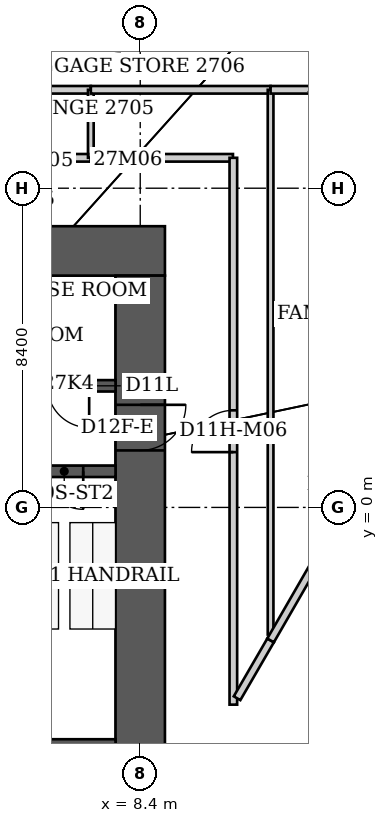
"""IFC4 building model, lengths in metres.
Left out: names, types, materials, properties, quantities, classifications, styles, units other than length and angle.
Written with IfcOpenShell. Run it as: python <this file> out.ifc"""

import sys

from ifc_helpers import new_model, si_unit, direction, frame, frame_2d, origin, place, context, subcontext, project, spatial, rectangle, extrude, element, fill, save


model = new_model("IFC4")
c1 = context("Model", 3, precision=1e-05, world=origin(), true_north=direction((0.0, 1.0)))
c2 = subcontext(c1, "Body", "Model", "MODEL_VIEW")
j1 = project(units=[si_unit("LENGTHUNIT", "METRE"), si_unit("PLANEANGLEUNIT", "RADIAN")], contexts=[c1])
p1 = place(None, origin())
s1 = spatial("IfcSite", under=j1, at=p1, CompositionType="ELEMENT")
p2 = place(p1, origin())
s2 = spatial("IfcBuilding", under=s1, at=p2, CompositionType="ELEMENT")
p3 = place(p2, frame((0.0, 0.0, 112.0)))
s3 = spatial("IfcBuildingStorey", under=s2, at=p3, CompositionType="ELEMENT", Elevation=112.0)
p4 = place(p3, frame((-9.05, 6.75, 0.0), z_axis=(0.0, 0.0, 1.0), x_axis=(1.0, 0.0, 0.0)))
e1 = element("IfcWall", 1, at=p4, inside=s3, PredefinedType="SHEAR", context=c2, shape_type="SweptSolid", body=[
    extrude(rectangle(XDim=18.1, YDim=1.3, at=frame_2d((9.05, 0.0))), origin(), (0.0, 0.0, 1.0), 3.8),
])
p5 = place(p3, frame((8.4, -9.2, 0.0), z_axis=(0.0, 0.0, 1.0), x_axis=(0.0, 1.0, 0.0)))
e2 = element("IfcWall", 2, at=p5, inside=s3, PredefinedType="SHEAR", context=c2, shape_type="SweptSolid", body=[
    extrude(rectangle(XDim=15.3, YDim=1.3, at=frame_2d((7.65, 0.0))), origin(), (0.0, 0.0, 1.0), 3.8),
])
p6 = place(p5, frame((10.7, 0.0, 0.0)))
e3 = element("IfcOpeningElement", 3, at=p6, cuts=e2, PredefinedType="OPENING", context=c2, shape_type="SweptSolid", body=[
    extrude(rectangle(XDim=1.2, YDim=2.2, at=frame_2d((0.6, 1.1))), frame((0.0, 0.65, 0.0), z_axis=(0.0, -1.0, 0.0), x_axis=(1.0, 0.0, 0.0)), (0.0, 0.0, 1.0), 1.3),
])
p7 = place(p3, frame((-7.75, -6.5, 0.0), z_axis=(0.0, 0.0, 1.0), x_axis=(1.0, 0.0, 0.0)))
e4 = element("IfcWall", 4, at=p7, inside=s3, PredefinedType="SHEAR", context=c2, shape_type="SweptSolid", body=[
    extrude(rectangle(XDim=15.5, YDim=0.8, at=frame_2d((7.75, 0.0))), origin(), (0.0, 0.0, 1.0), 3.8),
])
p8 = place(p3, frame((4.75, 0.95, 0.0), z_axis=(0.0, 0.0, 1.0), x_axis=(1.0, 0.0, 0.0)))
e5 = element("IfcWall", 5, at=p8, inside=s3, PredefinedType="SHEAR", context=c2, shape_type="SweptSolid", body=[
    extrude(rectangle(XDim=3.0, YDim=0.3, at=frame_2d((1.5, 0.0))), origin(), (0.0, 0.0, 1.0), 3.8),
])
p9 = place(p8, frame((1.15, 0.0, 0.0)))
e6 = element("IfcOpeningElement", 6, at=p9, cuts=e5, PredefinedType="OPENING", context=c2, shape_type="SweptSolid", body=[
    extrude(rectangle(XDim=1.0, YDim=2.2, at=frame_2d((0.5, 1.1))), frame((0.0, 0.15, 0.0), z_axis=(0.0, -1.0, 0.0), x_axis=(1.0, 0.0, 0.0)), (0.0, 0.0, 1.0), 0.3),
])
p10 = place(p3, frame((-7.75, 3.2, 0.0), z_axis=(0.0, 0.0, 1.0), x_axis=(1.0, 0.0, 0.0)))
e7 = element("IfcWall", 7, at=p10, inside=s3, PredefinedType="SHEAR", context=c2, shape_type="SweptSolid", body=[
    extrude(rectangle(XDim=15.5, YDim=0.3, at=frame_2d((7.75, 0.0))), origin(), (0.0, 0.0, 1.0), 3.8),
])
p11 = place(p10, frame((5.688, 0.0, 0.0)))
e8 = element("IfcOpeningElement", 8, at=p11, cuts=e7, PredefinedType="OPENING", context=c2, shape_type="SweptSolid", body=[
    extrude(rectangle(XDim=1.1, YDim=2.2, at=frame_2d((0.55, 1.1))), frame((0.0, 0.15, 0.0), z_axis=(0.0, -1.0, 0.0), x_axis=(1.0, 0.0, 0.0)), (0.0, 0.0, 1.0), 0.3),
])
p12 = place(p10, frame((8.031, 0.0, 0.0)))
e9 = element("IfcOpeningElement", 9, at=p12, cuts=e7, PredefinedType="OPENING", context=c2, shape_type="SweptSolid", body=[
    extrude(rectangle(XDim=1.1, YDim=2.2, at=frame_2d((0.55, 1.1))), frame((0.0, 0.15, 0.0), z_axis=(0.0, -1.0, 0.0), x_axis=(1.0, 0.0, 0.0)), (0.0, 0.0, 1.0), 0.3),
])
p13 = place(p10, frame((10.85, 0.0, 0.0)))
e10 = element("IfcOpeningElement", 10, at=p13, cuts=e7, PredefinedType="OPENING", context=c2, shape_type="SweptSolid", body=[
    extrude(rectangle(XDim=1.1, YDim=2.2, at=frame_2d((0.55, 1.1))), frame((0.0, 0.15, 0.0), z_axis=(0.0, -1.0, 0.0), x_axis=(1.0, 0.0, 0.0)), (0.0, 0.0, 1.0), 0.3),
])
p14 = place(p10, frame((13.706, 0.0, 0.0)))
e11 = element("IfcOpeningElement", 11, at=p14, cuts=e7, PredefinedType="OPENING", context=c2, shape_type="SweptSolid", body=[
    extrude(rectangle(XDim=1.1, YDim=2.2, at=frame_2d((0.55, 1.1))), frame((0.0, 0.15, 0.0), z_axis=(0.0, -1.0, 0.0), x_axis=(1.0, 0.0, 0.0)), (0.0, 0.0, 1.0), 0.3),
])
p15 = place(p3, frame((2.37, 10.99, 0.0), z_axis=(0.0, 0.0, 1.0), x_axis=(1.0, 0.0, 0.0)))
e12 = element("IfcWall", 12, at=p15, inside=s3, PredefinedType="PARTITIONING", context=c2, shape_type="SweptSolid", body=[
    extrude(rectangle(XDim=4.73, YDim=0.2, at=frame_2d((2.365, 0.0))), origin(), (0.0, 0.0, 1.0), 3.64),
])
p16 = place(p15, frame((1.815, 0.0, 0.0)))
e13 = element("IfcOpeningElement", 13, at=p16, cuts=e12, PredefinedType="OPENING", context=c2, shape_type="SweptSolid", body=[
    extrude(rectangle(XDim=1.1, YDim=2.2, at=frame_2d((0.55, 1.1))), frame((0.0, 0.1, 0.0), z_axis=(0.0, -1.0, 0.0), x_axis=(1.0, 0.0, 0.0)), (0.0, 0.0, 1.0), 0.2),
])
p17 = place(p3, frame((7.1, 9.2, 0.0), z_axis=(0.0, 0.0, 1.0), x_axis=(-1.0, 0.0, 0.0)))
e14 = element("IfcWall", 14, at=p17, inside=s3, PredefinedType="PARTITIONING", context=c2, shape_type="SweptSolid", body=[
    extrude(rectangle(XDim=4.73, YDim=0.2, at=frame_2d((2.365, 0.0))), origin(), (0.0, 0.0, 1.0), 3.64),
])
p18 = place(p3, frame((7.1, 10.99, 0.0), z_axis=(0.0, 0.0, 1.0), x_axis=(0.0, -1.0, 0.0)))
e15 = element("IfcWall", 15, at=p18, inside=s3, PredefinedType="PARTITIONING", context=c2, shape_type="SweptSolid", body=[
    extrude(rectangle(XDim=1.79, YDim=0.15, at=frame_2d((0.895, 0.0))), origin(), (0.0, 0.0, 1.0), 3.64),
])
p19 = place(p3, frame((7.1, 10.99, 0.0), z_axis=(0.0, 0.0, 1.0), x_axis=(1.0, 0.0, 0.0)))
e16 = element("IfcWall", 16, at=p19, inside=s3, PredefinedType="PARTITIONING", context=c2, shape_type="SweptSolid", body=[
    extrude(rectangle(XDim=4.73, YDim=0.2, at=frame_2d((2.365, 0.0))), origin(), (0.0, 0.0, 1.0), 3.64),
])
p20 = place(p3, frame((10.84, 9.2, 0.0), z_axis=(0.0, 0.0, 1.0), x_axis=(-1.0, 0.0, 0.0)))
e17 = element("IfcWall", 17, at=p20, inside=s3, PredefinedType="PARTITIONING", context=c2, shape_type="SweptSolid", body=[
    extrude(rectangle(XDim=3.74, YDim=0.2, at=frame_2d((1.87, 0.0))), origin(), (0.0, 0.0, 1.0), 3.64),
])
p21 = place(p3, frame((10.85, -5.19, 0.0), z_axis=(0.0, 0.0, 1.0), x_axis=(0.0, 1.0, 0.0)))
e18 = element("IfcWall", 18, at=p21, inside=s3, PredefinedType="PARTITIONING", context=c2, shape_type="SweptSolid", body=[
    extrude(rectangle(XDim=14.39, YDim=0.2, at=frame_2d((7.195, 0.0))), origin(), (0.0, 0.0, 1.0), 3.64),
])
p22 = place(p21, frame((6.645, 0.0, 0.0)))
e19 = element("IfcOpeningElement", 19, at=p22, cuts=e18, PredefinedType="OPENING", context=c2, shape_type="SweptSolid", body=[
    extrude(rectangle(XDim=1.1, YDim=2.2, at=frame_2d((0.55, 1.1))), frame((0.0, 0.1, 0.0), z_axis=(0.0, -1.0, 0.0), x_axis=(1.0, 0.0, 0.0)), (0.0, 0.0, 1.0), 0.2),
])
p23 = place(p3, frame((11.83, -3.5, 0.0), z_axis=(0.0, 0.0, 1.0), x_axis=(-0.501720167394, -0.865029984237, 0.0)))
e20 = element("IfcWall", 20, at=p23, inside=s3, PredefinedType="PARTITIONING", context=c2, shape_type="SweptSolid", body=[
    extrude(rectangle(XDim=1.759, YDim=0.2, at=frame_2d((0.879, 0.0))), origin(), (0.0, 0.0, 1.0), 3.64),
])
p24 = place(p3, frame((11.83, 10.99, 0.0), z_axis=(0.0, 0.0, 1.0), x_axis=(0.0, -1.0, 0.0)))
e21 = element("IfcWall", 21, at=p24, inside=s3, PredefinedType="PARTITIONING", context=c2, shape_type="SweptSolid", body=[
    extrude(rectangle(XDim=14.335, YDim=0.15, at=frame_2d((7.167, 0.0))), origin(), (0.0, 0.0, 1.0), 3.64),
])
p25 = place(p3, frame((11.83, 10.99, 0.0), z_axis=(0.0, 0.0, 1.0), x_axis=(1.0, 0.0, 0.0)))
e22 = element("IfcWall", 22, at=p25, inside=s3, PredefinedType="PARTITIONING", context=c2, shape_type="SweptSolid", body=[
    extrude(rectangle(XDim=1.1, YDim=0.2, at=frame_2d((0.55, 0.0))), origin(), (0.0, 0.0, 1.0), 3.64),
])
p26 = place(p3, frame((16.56, 4.7, 0.0), z_axis=(0.0, 0.0, 1.0), x_axis=(-0.499662169849, -0.866220362276, 0.0)))
e23 = element("IfcWall", 23, at=p26, inside=s3, PredefinedType="PARTITIONING", context=c2, shape_type="SweptSolid", body=[
    extrude(rectangle(XDim=9.466, YDim=0.2, at=frame_2d((4.733, 0.0))), origin(), (0.0, 0.0, 1.0), 3.64),
])
p27 = place(p26, frame((4.183, 0.0, 0.0)))
e24 = element("IfcOpeningElement", 24, at=p27, cuts=e23, PredefinedType="OPENING", context=c2, shape_type="SweptSolid", body=[
    extrude(rectangle(XDim=1.1, YDim=2.2, at=frame_2d((0.55, 1.1))), frame((0.0, 0.1, 0.0), z_axis=(0.0, -1.0, 0.0), x_axis=(1.0, 0.0, 0.0)), (0.0, 0.0, 1.0), 0.2),
])
p28 = place(p22, origin())
e25 = element("IfcDoor", 25, at=p28, inside=s3, OperationType="SINGLE_SWING_LEFT", PredefinedType="DOOR", context=c2, shape_type="SweptSolid", body=[
    extrude(rectangle(XDim=1.1, YDim=2.2, at=frame_2d((0.55, 1.1))), frame((0.0, 0.025, 0.0), z_axis=(0.0, -1.0, 0.0), x_axis=(1.0, 0.0, 0.0)), (0.0, 0.0, 1.0), 0.05),
])
fill(e19, e25)
p29 = place(p9, origin())
e26 = element("IfcDoor", 26, at=p29, inside=s3, OperationType="SINGLE_SWING_RIGHT", PredefinedType="DOOR", context=c2, shape_type="SweptSolid", body=[
    extrude(rectangle(XDim=1.0, YDim=2.2, at=frame_2d((0.5, 1.1))), frame((0.0, 0.025, 0.0), z_axis=(0.0, -1.0, 0.0), x_axis=(1.0, 0.0, 0.0)), (0.0, 0.0, 1.0), 0.05),
])
fill(e6, e26)
p30 = place(p6, origin())
e27 = element("IfcDoor", 27, at=p30, inside=s3, OperationType="SINGLE_SWING_RIGHT", PredefinedType="DOOR", context=c2, shape_type="SweptSolid", body=[
    extrude(rectangle(XDim=1.2, YDim=2.2, at=frame_2d((0.6, 1.1))), frame((0.0, 0.025, 0.0), z_axis=(0.0, -1.0, 0.0), x_axis=(1.0, 0.0, 0.0)), (0.0, 0.0, 1.0), 0.05),
])
fill(e3, e27)
p31 = place(p14, origin())
e28 = element("IfcDoor", 28, at=p31, inside=s3, OperationType="SINGLE_SWING_RIGHT", PredefinedType="DOOR", context=c2, shape_type="SweptSolid", body=[
    extrude(rectangle(XDim=1.1, YDim=2.2, at=frame_2d((0.55, 1.1))), frame((0.0, 0.025, 0.0), z_axis=(0.0, -1.0, 0.0), x_axis=(1.0, 0.0, 0.0)), (0.0, 0.0, 1.0), 0.05),
])
fill(e11, e28)
save(model, sys.argv[1])
